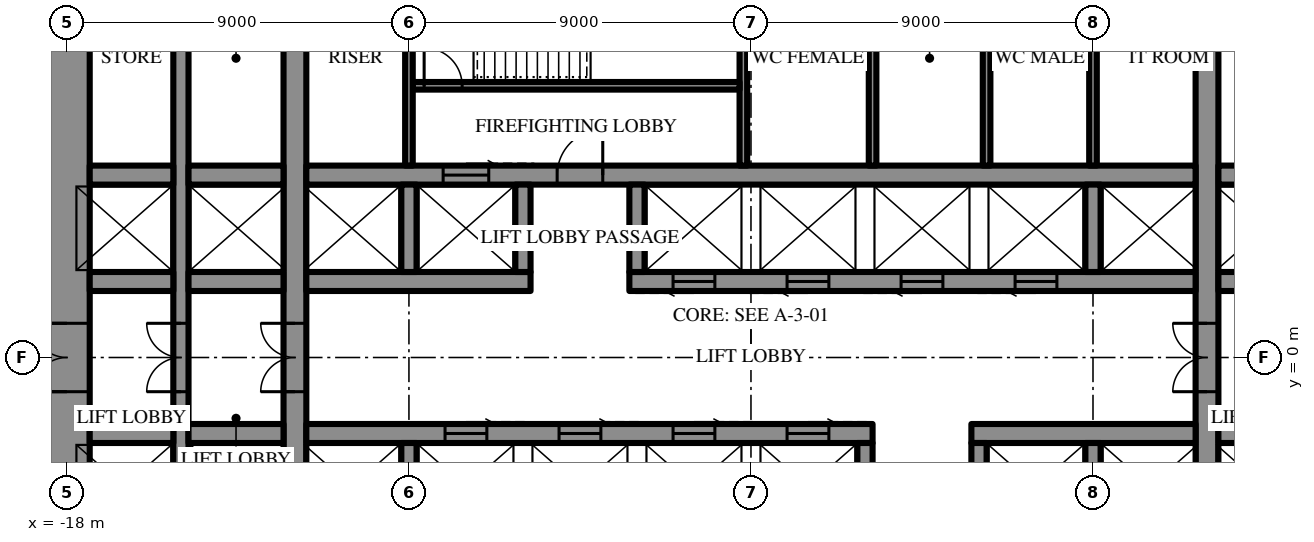
"""IFC4 building model, lengths in metres.
Left out: names, types, materials, properties, quantities, classifications, styles, units other than length and angle.
Written with IfcOpenShell. Run it as: python <this file> out.ifc"""

import sys

from ifc_helpers import new_model, si_unit, direction, frame, frame_2d, origin, place, context, subcontext, project, spatial, rectangle, extrude, element, fill, save


model = new_model("IFC4")
c1 = context("Model", 3, precision=1e-05, world=origin(), true_north=direction((0.0, 1.0)))
c2 = subcontext(c1, "Body", "Model", "MODEL_VIEW")
j1 = project(units=[si_unit("LENGTHUNIT", "METRE"), si_unit("PLANEANGLEUNIT", "RADIAN")], contexts=[c1])
p1 = place(None, origin())
s1 = spatial("IfcSite", under=j1, at=p1, CompositionType="ELEMENT")
p2 = place(p1, origin())
s2 = spatial("IfcBuilding", under=s1, at=p2, CompositionType="ELEMENT")
p3 = place(p2, frame((0.0, 0.0, 52.9)))
s3 = spatial("IfcBuildingStorey", under=s2, at=p3, CompositionType="ELEMENT", Elevation=52.9)
p4 = place(p3, frame((-18.0, 10.7, 0.0), z_axis=(0.0, 0.0, 1.0), x_axis=(0.0, -1.0, 0.0)))
e1 = element("IfcWall", 1, at=p4, inside=s3, PredefinedType="SHEAR", context=c2, shape_type="SweptSolid", body=[
    extrude(rectangle(XDim=21.4, YDim=1.2, at=frame_2d((10.7, 0.0))), origin(), (0.0, 0.0, 1.0), 4.2),
])
p5 = place(p4, frame((9.8, 0.0, 0.0)))
e2 = element("IfcOpeningElement", 2, at=p5, cuts=e1, PredefinedType="OPENING", context=c2, shape_type="SweptSolid", body=[
    extrude(rectangle(XDim=1.8, YDim=2.4, at=frame_2d((0.9, 1.2))), frame((0.0, 0.61, 0.0), z_axis=(0.0, -1.0, 0.0), x_axis=(1.0, 0.0, 0.0)), (0.0, 0.0, 1.0), 1.22),
])
p6 = place(p3, frame((12.0, -10.7, 0.0), z_axis=(0.0, 0.0, 1.0), x_axis=(0.0, 1.0, 0.0)))
e3 = element("IfcWall", 3, at=p6, inside=s3, PredefinedType="SHEAR", context=c2, shape_type="SweptSolid", body=[
    extrude(rectangle(XDim=21.4, YDim=0.6, at=frame_2d((10.7, 0.0))), origin(), (0.0, 0.0, 1.0), 4.2),
])
p7 = place(p6, frame((9.8, 0.0, 0.0)))
e4 = element("IfcOpeningElement", 4, at=p7, cuts=e3, PredefinedType="OPENING", context=c2, shape_type="SweptSolid", body=[
    extrude(rectangle(XDim=1.8, YDim=2.4, at=frame_2d((0.9, 1.2))), frame((0.0, 0.31, 0.0), z_axis=(0.0, -1.0, 0.0), x_axis=(1.0, 0.0, 0.0)), (0.0, 0.0, 1.0), 0.62),
])
p8 = place(p3, frame((-12.0, -10.7, 0.0), z_axis=(0.0, 0.0, 1.0), x_axis=(0.0, 1.0, 0.0)))
e5 = element("IfcWall", 5, at=p8, inside=s3, PredefinedType="SHEAR", context=c2, shape_type="SweptSolid", body=[
    extrude(rectangle(XDim=21.4, YDim=0.6, at=frame_2d((10.7, 0.0))), origin(), (0.0, 0.0, 1.0), 4.2),
])
p9 = place(p8, frame((9.8, 0.0, 0.0)))
e6 = element("IfcOpeningElement", 6, at=p9, cuts=e5, PredefinedType="OPENING", context=c2, shape_type="SweptSolid", body=[
    extrude(rectangle(XDim=1.8, YDim=2.4, at=frame_2d((0.9, 1.2))), frame((0.0, 0.31, 0.0), z_axis=(0.0, -1.0, 0.0), x_axis=(1.0, 0.0, 0.0)), (0.0, 0.0, 1.0), 0.62),
])
p10 = place(p3, frame((-15.0, -10.7, 0.0), z_axis=(0.0, 0.0, 1.0), x_axis=(0.0, 1.0, 0.0)))
e7 = element("IfcWall", 7, at=p10, inside=s3, PredefinedType="SHEAR", context=c2, shape_type="SweptSolid", body=[
    extrude(rectangle(XDim=21.4, YDim=0.4, at=frame_2d((10.7, 0.0))), origin(), (0.0, 0.0, 1.0), 4.2),
])
p11 = place(p10, frame((9.8, 0.0, 0.0)))
e8 = element("IfcOpeningElement", 8, at=p11, cuts=e7, PredefinedType="OPENING", context=c2, shape_type="SweptSolid", body=[
    extrude(rectangle(XDim=1.8, YDim=2.4, at=frame_2d((0.9, 1.2))), frame((0.0, 0.21, 0.0), z_axis=(0.0, -1.0, 0.0), x_axis=(1.0, 0.0, 0.0)), (0.0, 0.0, 1.0), 0.42),
])
p12 = place(p3, frame((-17.4, 2.0, 0.0), z_axis=(0.0, 0.0, 1.0), x_axis=(1.0, 0.0, 0.0)))
e9 = element("IfcWall", 9, at=p12, inside=s3, PredefinedType="SHEAR", context=c2, shape_type="SweptSolid", body=[
    extrude(rectangle(XDim=2.2, YDim=0.5, at=frame_2d((1.1, 0.0))), origin(), (0.0, 0.0, 1.0), 4.2),
])
p13 = place(p3, frame((-14.8, 2.0, 0.0), z_axis=(0.0, 0.0, 1.0), x_axis=(1.0, 0.0, 0.0)))
e10 = element("IfcWall", 10, at=p13, inside=s3, PredefinedType="SHEAR", context=c2, shape_type="SweptSolid", body=[
    extrude(rectangle(XDim=2.5, YDim=0.5, at=frame_2d((1.25, 0.0))), origin(), (0.0, 0.0, 1.0), 4.2),
])
p14 = place(p3, frame((-11.7, 2.0, 0.0), z_axis=(0.0, 0.0, 1.0), x_axis=(1.0, 0.0, 0.0)))
e11 = element("IfcWall", 11, at=p14, inside=s3, PredefinedType="SHEAR", context=c2, shape_type="SweptSolid", body=[
    extrude(rectangle(XDim=5.9, YDim=0.5, at=frame_2d((2.95, 0.0))), origin(), (0.0, 0.0, 1.0), 4.2),
])
p15 = place(p3, frame((-3.2, 2.0, 0.0), z_axis=(0.0, 0.0, 1.0), x_axis=(1.0, 0.0, 0.0)))
e12 = element("IfcWall", 12, at=p15, inside=s3, PredefinedType="SHEAR", context=c2, shape_type="SweptSolid", body=[
    extrude(rectangle(XDim=14.9, YDim=0.5, at=frame_2d((7.45, 0.0))), origin(), (0.0, 0.0, 1.0), 4.2),
])
p16 = place(p15, frame((1.15, 0.0, 0.0)))
e13 = element("IfcOpeningElement", 13, at=p16, cuts=e12, PredefinedType="OPENING", context=c2, shape_type="SweptSolid", body=[
    extrude(rectangle(XDim=1.1, YDim=2.2, at=frame_2d((0.55, 1.1))), frame((0.0, 0.26, 0.0), z_axis=(0.0, -1.0, 0.0), x_axis=(1.0, 0.0, 0.0)), (0.0, 0.0, 1.0), 0.52),
])
p17 = place(p15, frame((4.15, 0.0, 0.0)))
e14 = element("IfcOpeningElement", 14, at=p17, cuts=e12, PredefinedType="OPENING", context=c2, shape_type="SweptSolid", body=[
    extrude(rectangle(XDim=1.1, YDim=2.2, at=frame_2d((0.55, 1.1))), frame((0.0, 0.26, 0.0), z_axis=(0.0, -1.0, 0.0), x_axis=(1.0, 0.0, 0.0)), (0.0, 0.0, 1.0), 0.52),
])
p18 = place(p15, frame((7.15, 0.0, 0.0)))
e15 = element("IfcOpeningElement", 15, at=p18, cuts=e12, PredefinedType="OPENING", context=c2, shape_type="SweptSolid", body=[
    extrude(rectangle(XDim=1.1, YDim=2.2, at=frame_2d((0.55, 1.1))), frame((0.0, 0.26, 0.0), z_axis=(0.0, -1.0, 0.0), x_axis=(1.0, 0.0, 0.0)), (0.0, 0.0, 1.0), 0.52),
])
p19 = place(p15, frame((10.15, 0.0, 0.0)))
e16 = element("IfcOpeningElement", 16, at=p19, cuts=e12, PredefinedType="OPENING", context=c2, shape_type="SweptSolid", body=[
    extrude(rectangle(XDim=1.1, YDim=2.2, at=frame_2d((0.55, 1.1))), frame((0.0, 0.26, 0.0), z_axis=(0.0, -1.0, 0.0), x_axis=(1.0, 0.0, 0.0)), (0.0, 0.0, 1.0), 0.52),
])
p20 = place(p3, frame((12.3, 2.0, 0.0), z_axis=(0.0, 0.0, 1.0), x_axis=(1.0, 0.0, 0.0)))
e17 = element("IfcWall", 17, at=p20, inside=s3, PredefinedType="SHEAR", context=c2, shape_type="SweptSolid", body=[
    extrude(rectangle(XDim=2.5, YDim=0.5, at=frame_2d((1.25, 0.0))), origin(), (0.0, 0.0, 1.0), 4.2),
])
p21 = place(p3, frame((-17.4, 4.8, 0.0), z_axis=(0.0, 0.0, 1.0), x_axis=(1.0, 0.0, 0.0)))
e18 = element("IfcWall", 18, at=p21, inside=s3, PredefinedType="SHEAR", context=c2, shape_type="SweptSolid", body=[
    extrude(rectangle(XDim=2.2, YDim=0.5, at=frame_2d((1.1, 0.0))), origin(), (0.0, 0.0, 1.0), 4.2),
])
p22 = place(p3, frame((-14.8, 4.8, 0.0), z_axis=(0.0, 0.0, 1.0), x_axis=(1.0, 0.0, 0.0)))
e19 = element("IfcWall", 19, at=p22, inside=s3, PredefinedType="SHEAR", context=c2, shape_type="SweptSolid", body=[
    extrude(rectangle(XDim=2.5, YDim=0.5, at=frame_2d((1.25, 0.0))), origin(), (0.0, 0.0, 1.0), 4.2),
])
p23 = place(p3, frame((-11.7, 4.8, 0.0), z_axis=(0.0, 0.0, 1.0), x_axis=(1.0, 0.0, 0.0)))
e20 = element("IfcWall", 20, at=p23, inside=s3, PredefinedType="SHEAR", context=c2, shape_type="SweptSolid", body=[
    extrude(rectangle(XDim=23.4, YDim=0.5, at=frame_2d((11.7, 0.0))), origin(), (0.0, 0.0, 1.0), 4.2),
])
p24 = place(p23, frame((6.6, 0.0, 0.0)))
e21 = element("IfcOpeningElement", 21, at=p24, cuts=e20, PredefinedType="OPENING", context=c2, shape_type="SweptSolid", body=[
    extrude(rectangle(XDim=1.2, YDim=2.2, at=frame_2d((0.6, 1.1))), frame((0.0, 0.26, 0.0), z_axis=(0.0, -1.0, 0.0), x_axis=(1.0, 0.0, 0.0)), (0.0, 0.0, 1.0), 0.52),
])
p25 = place(p23, frame((3.6, 0.0, 0.0)))
e22 = element("IfcOpeningElement", 22, at=p25, cuts=e20, PredefinedType="OPENING", context=c2, shape_type="SweptSolid", body=[
    extrude(rectangle(XDim=1.2, YDim=2.2, at=frame_2d((0.6, 1.1))), frame((0.0, 0.26, 0.0), z_axis=(0.0, -1.0, 0.0), x_axis=(1.0, 0.0, 0.0)), (0.0, 0.0, 1.0), 0.52),
])
p26 = place(p3, frame((12.3, 4.8, 0.0), z_axis=(0.0, 0.0, 1.0), x_axis=(1.0, 0.0, 0.0)))
e23 = element("IfcWall", 23, at=p26, inside=s3, PredefinedType="SHEAR", context=c2, shape_type="SweptSolid", body=[
    extrude(rectangle(XDim=2.5, YDim=0.5, at=frame_2d((1.25, 0.0))), origin(), (0.0, 0.0, 1.0), 4.2),
])
for number, where, z_axis, x_axis in (
    (24, (-9.0, 2.25, 0.0), (0.0, 0.0, 1.0), (0.0, 1.0, 0.0)),
    (25, (-6.0, 2.25, 0.0), (0.0, 0.0, 1.0), (0.0, 1.0, 0.0)),
    (26, (-3.0, 2.25, 0.0), (0.0, 0.0, 1.0), (0.0, 1.0, 0.0)),
    (27, (9.0, 2.25, 0.0), (0.0, 0.0, 1.0), (0.0, 1.0, 0.0)),
):
    element("IfcWall", number, at=place(p3, frame(where, z_axis=z_axis, x_axis=x_axis)), inside=s3, PredefinedType="SHEAR", context=c2, shape_type="SweptSolid", body=[
        extrude(rectangle(XDim=2.3, YDim=0.4, at=frame_2d((1.15, 0.0))), origin(), (0.0, 0.0, 1.0), 4.2),
    ])
p27 = place(p3, frame((-0.2, 5.05, 0.0), z_axis=(0.0, 0.0, 1.0), x_axis=(0.0, 1.0, 0.0)))
e28 = element("IfcWall", 28, at=p27, inside=s3, PredefinedType="SHEAR", context=c2, shape_type="SweptSolid", body=[
    extrude(rectangle(XDim=5.65, YDim=0.2, at=frame_2d((2.825, 0.0))), origin(), (0.0, 0.0, 1.0), 4.2),
])
p28 = place(p3, frame((-8.9, 7.15, 0.0), z_axis=(0.0, 0.0, 1.0), x_axis=(1.0, 0.0, 0.0)))
e29 = element("IfcWall", 29, at=p28, inside=s3, PredefinedType="SHEAR", context=c2, shape_type="SweptSolid", body=[
    extrude(rectangle(XDim=8.6, YDim=0.2, at=frame_2d((4.3, 0.0))), origin(), (0.0, 0.0, 1.0), 4.2),
])
p29 = place(p28, frame((0.3, 0.0, 0.0)))
e30 = element("IfcOpeningElement", 30, at=p29, cuts=e29, PredefinedType="OPENING", context=c2, shape_type="SweptSolid", body=[
    extrude(rectangle(XDim=1.0, YDim=2.2, at=frame_2d((0.5, 1.1))), frame((0.0, 0.11, 0.0), z_axis=(0.0, -1.0, 0.0), x_axis=(1.0, 0.0, 0.0)), (0.0, 0.0, 1.0), 0.22),
])
p30 = place(p3, frame((14.8, -2.0, 0.0), z_axis=(0.0, 0.0, 1.0), x_axis=(-1.0, 0.0, 0.0)))
e31 = element("IfcWall", 31, at=p30, inside=s3, PredefinedType="SHEAR", context=c2, shape_type="SweptSolid", body=[
    extrude(rectangle(XDim=2.5, YDim=0.5, at=frame_2d((1.25, 0.0))), origin(), (0.0, 0.0, 1.0), 4.2),
])
p31 = place(p3, frame((11.7, -2.0, 0.0), z_axis=(0.0, 0.0, 1.0), x_axis=(-1.0, 0.0, 0.0)))
e32 = element("IfcWall", 32, at=p31, inside=s3, PredefinedType="SHEAR", context=c2, shape_type="SweptSolid", body=[
    extrude(rectangle(XDim=5.9, YDim=0.5, at=frame_2d((2.95, 0.0))), origin(), (0.0, 0.0, 1.0), 4.2),
])
p32 = place(p3, frame((3.2, -2.0, 0.0), z_axis=(0.0, 0.0, 1.0), x_axis=(-1.0, 0.0, 0.0)))
e33 = element("IfcWall", 33, at=p32, inside=s3, PredefinedType="SHEAR", context=c2, shape_type="SweptSolid", body=[
    extrude(rectangle(XDim=14.9, YDim=0.5, at=frame_2d((7.45, 0.0))), origin(), (0.0, 0.0, 1.0), 4.2),
])
p33 = place(p32, frame((1.15, 0.0, 0.0)))
e34 = element("IfcOpeningElement", 34, at=p33, cuts=e33, PredefinedType="OPENING", context=c2, shape_type="SweptSolid", body=[
    extrude(rectangle(XDim=1.1, YDim=2.2, at=frame_2d((0.55, 1.1))), frame((0.0, 0.26, 0.0), z_axis=(0.0, -1.0, 0.0), x_axis=(1.0, 0.0, 0.0)), (0.0, 0.0, 1.0), 0.52),
])
p34 = place(p32, frame((4.15, 0.0, 0.0)))
e35 = element("IfcOpeningElement", 35, at=p34, cuts=e33, PredefinedType="OPENING", context=c2, shape_type="SweptSolid", body=[
    extrude(rectangle(XDim=1.1, YDim=2.2, at=frame_2d((0.55, 1.1))), frame((0.0, 0.26, 0.0), z_axis=(0.0, -1.0, 0.0), x_axis=(1.0, 0.0, 0.0)), (0.0, 0.0, 1.0), 0.52),
])
p35 = place(p32, frame((7.15, 0.0, 0.0)))
e36 = element("IfcOpeningElement", 36, at=p35, cuts=e33, PredefinedType="OPENING", context=c2, shape_type="SweptSolid", body=[
    extrude(rectangle(XDim=1.1, YDim=2.2, at=frame_2d((0.55, 1.1))), frame((0.0, 0.26, 0.0), z_axis=(0.0, -1.0, 0.0), x_axis=(1.0, 0.0, 0.0)), (0.0, 0.0, 1.0), 0.52),
])
p36 = place(p32, frame((10.15, 0.0, 0.0)))
e37 = element("IfcOpeningElement", 37, at=p36, cuts=e33, PredefinedType="OPENING", context=c2, shape_type="SweptSolid", body=[
    extrude(rectangle(XDim=1.1, YDim=2.2, at=frame_2d((0.55, 1.1))), frame((0.0, 0.26, 0.0), z_axis=(0.0, -1.0, 0.0), x_axis=(1.0, 0.0, 0.0)), (0.0, 0.0, 1.0), 0.52),
])
p37 = place(p3, frame((-12.3, -2.0, 0.0), z_axis=(0.0, 0.0, 1.0), x_axis=(-1.0, 0.0, 0.0)))
e38 = element("IfcWall", 38, at=p37, inside=s3, PredefinedType="SHEAR", context=c2, shape_type="SweptSolid", body=[
    extrude(rectangle(XDim=2.5, YDim=0.5, at=frame_2d((1.25, 0.0))), origin(), (0.0, 0.0, 1.0), 4.2),
])
p38 = place(p3, frame((-15.2, -2.0, 0.0), z_axis=(0.0, 0.0, 1.0), x_axis=(-1.0, 0.0, 0.0)))
e39 = element("IfcWall", 39, at=p38, inside=s3, PredefinedType="SHEAR", context=c2, shape_type="SweptSolid", body=[
    extrude(rectangle(XDim=2.2, YDim=0.5, at=frame_2d((1.1, 0.0))), origin(), (0.0, 0.0, 1.0), 4.2),
])
for number, where, z_axis, x_axis in (
    (40, (9.0, -2.25, 0.0), (0.0, 0.0, 1.0), (0.0, -1.0, 0.0)),
    (41, (6.0, -2.25, 0.0), (0.0, 0.0, 1.0), (0.0, -1.0, 0.0)),
    (42, (3.0, -2.25, 0.0), (0.0, 0.0, 1.0), (0.0, -1.0, 0.0)),
    (43, (-9.0, -2.25, 0.0), (0.0, 0.0, 1.0), (0.0, -1.0, 0.0)),
):
    element("IfcWall", number, at=place(p3, frame(where, z_axis=z_axis, x_axis=x_axis)), inside=s3, PredefinedType="SHEAR", context=c2, shape_type="SweptSolid", body=[
        extrude(rectangle(XDim=2.3, YDim=0.4, at=frame_2d((1.15, 0.0))), origin(), (0.0, 0.0, 1.0), 4.2),
    ])
for number, where, z_axis, x_axis in (
    (44, (-9.0, 5.05, 0.0), (0.0, 0.0, 1.0), (0.0, 1.0, 0.0)),
    (45, (9.0, 5.05, 0.0), (0.0, 0.0, 1.0), (0.0, 1.0, 0.0)),
    (46, (3.2, 5.05, 0.0), (0.0, 0.0, 1.0), (0.0, 1.0, 0.0)),
    (47, (6.2, 5.05, 0.0), (0.0, 0.0, 1.0), (0.0, 1.0, 0.0)),
):
    element("IfcWall", number, at=place(p3, frame(where, z_axis=z_axis, x_axis=x_axis)), inside=s3, PredefinedType="PARTITIONING", context=c2, shape_type="SweptSolid", body=[
        extrude(rectangle(XDim=5.65, YDim=0.2, at=frame_2d((2.825, 0.0))), origin(), (0.0, 0.0, 1.0), 4.0),
    ])
p39 = place(p5, frame((1.8, 0.0, 0.0), z_axis=(0.0, 0.0, 1.0), x_axis=(-1.0, 0.0, 0.0)))
e48 = element("IfcDoor", 48, at=p39, inside=s3, OperationType="DOUBLE_DOOR_SINGLE_SWING", PredefinedType="DOOR", context=c2, shape_type="SweptSolid", body=[
    extrude(rectangle(XDim=1.8, YDim=2.4, at=frame_2d((0.9, 1.2))), frame((0.0, 0.025, 0.0), z_axis=(0.0, -1.0, 0.0), x_axis=(1.0, 0.0, 0.0)), (0.0, 0.0, 1.0), 0.05),
])
fill(e2, e48)
p40 = place(p24, origin())
e49 = element("IfcDoor", 49, at=p40, inside=s3, OperationType="SINGLE_SWING_LEFT", PredefinedType="DOOR", context=c2, shape_type="SweptSolid", body=[
    extrude(rectangle(XDim=1.2, YDim=2.2, at=frame_2d((0.6, 1.1))), frame((0.0, 0.025, 0.0), z_axis=(0.0, -1.0, 0.0), x_axis=(1.0, 0.0, 0.0)), (0.0, 0.0, 1.0), 0.05),
])
fill(e21, e49)
p41 = place(p29, origin())
e50 = element("IfcDoor", 50, at=p41, inside=s3, OperationType="SINGLE_SWING_RIGHT", PredefinedType="DOOR", context=c2, shape_type="SweptSolid", body=[
    extrude(rectangle(XDim=1.0, YDim=2.2, at=frame_2d((0.5, 1.1))), frame((0.0, 0.025, 0.0), z_axis=(0.0, -1.0, 0.0), x_axis=(1.0, 0.0, 0.0)), (0.0, 0.0, 1.0), 0.05),
])
fill(e30, e50)
p42 = place(p7, origin())
e51 = element("IfcDoor", 51, at=p42, inside=s3, OperationType="DOUBLE_DOOR_SINGLE_SWING", PredefinedType="DOOR", context=c2, shape_type="SweptSolid", body=[
    extrude(rectangle(XDim=1.8, YDim=2.4, at=frame_2d((0.9, 1.2))), frame((0.0, 0.025, 0.0), z_axis=(0.0, -1.0, 0.0), x_axis=(1.0, 0.0, 0.0)), (0.0, 0.0, 1.0), 0.05),
])
fill(e4, e51)
p43 = place(p9, origin())
e52 = element("IfcDoor", 52, at=p43, inside=s3, OperationType="DOUBLE_DOOR_SINGLE_SWING", PredefinedType="DOOR", context=c2, shape_type="SweptSolid", body=[
    extrude(rectangle(XDim=1.8, YDim=2.4, at=frame_2d((0.9, 1.2))), frame((0.0, 0.025, 0.0), z_axis=(0.0, -1.0, 0.0), x_axis=(1.0, 0.0, 0.0)), (0.0, 0.0, 1.0), 0.05),
])
fill(e6, e52)
p44 = place(p11, origin())
e53 = element("IfcDoor", 53, at=p44, inside=s3, OperationType="DOUBLE_DOOR_SINGLE_SWING", PredefinedType="DOOR", context=c2, shape_type="SweptSolid", body=[
    extrude(rectangle(XDim=1.8, YDim=2.4, at=frame_2d((0.9, 1.2))), frame((0.0, 0.025, 0.0), z_axis=(0.0, -1.0, 0.0), x_axis=(1.0, 0.0, 0.0)), (0.0, 0.0, 1.0), 0.05),
])
fill(e8, e53)
p45 = place(p25, origin())
e54 = element("IfcDoor", 54, at=p45, inside=s3, OperationType="SLIDING_TO_LEFT", PredefinedType="DOOR", context=c2, shape_type="SweptSolid", body=[
    extrude(rectangle(XDim=1.2, YDim=2.2, at=frame_2d((0.6, 1.1))), frame((0.0, 0.025, 0.0), z_axis=(0.0, -1.0, 0.0), x_axis=(1.0, 0.0, 0.0)), (0.0, 0.0, 1.0), 0.05),
])
fill(e22, e54)
p46 = place(p16, frame((1.1, 0.0, 0.0), z_axis=(0.0, 0.0, 1.0), x_axis=(-1.0, 0.0, 0.0)))
e55 = element("IfcDoor", 55, at=p46, inside=s3, OperationType="SLIDING_TO_LEFT", PredefinedType="DOOR", context=c2, shape_type="SweptSolid", body=[
    extrude(rectangle(XDim=1.1, YDim=2.2, at=frame_2d((0.55, 1.1))), frame((0.0, 0.025, 0.0), z_axis=(0.0, -1.0, 0.0), x_axis=(1.0, 0.0, 0.0)), (0.0, 0.0, 1.0), 0.05),
])
fill(e13, e55)
p47 = place(p17, frame((1.1, 0.0, 0.0), z_axis=(0.0, 0.0, 1.0), x_axis=(-1.0, 0.0, 0.0)))
e56 = element("IfcDoor", 56, at=p47, inside=s3, OperationType="SLIDING_TO_LEFT", PredefinedType="DOOR", context=c2, shape_type="SweptSolid", body=[
    extrude(rectangle(XDim=1.1, YDim=2.2, at=frame_2d((0.55, 1.1))), frame((0.0, 0.025, 0.0), z_axis=(0.0, -1.0, 0.0), x_axis=(1.0, 0.0, 0.0)), (0.0, 0.0, 1.0), 0.05),
])
fill(e14, e56)
p48 = place(p18, frame((1.1, 0.0, 0.0), z_axis=(0.0, 0.0, 1.0), x_axis=(-1.0, 0.0, 0.0)))
e57 = element("IfcDoor", 57, at=p48, inside=s3, OperationType="SLIDING_TO_LEFT", PredefinedType="DOOR", context=c2, shape_type="SweptSolid", body=[
    extrude(rectangle(XDim=1.1, YDim=2.2, at=frame_2d((0.55, 1.1))), frame((0.0, 0.025, 0.0), z_axis=(0.0, -1.0, 0.0), x_axis=(1.0, 0.0, 0.0)), (0.0, 0.0, 1.0), 0.05),
])
fill(e15, e57)
p49 = place(p19, frame((1.1, 0.0, 0.0), z_axis=(0.0, 0.0, 1.0), x_axis=(-1.0, 0.0, 0.0)))
e58 = element("IfcDoor", 58, at=p49, inside=s3, OperationType="SLIDING_TO_LEFT", PredefinedType="DOOR", context=c2, shape_type="SweptSolid", body=[
    extrude(rectangle(XDim=1.1, YDim=2.2, at=frame_2d((0.55, 1.1))), frame((0.0, 0.025, 0.0), z_axis=(0.0, -1.0, 0.0), x_axis=(1.0, 0.0, 0.0)), (0.0, 0.0, 1.0), 0.05),
])
fill(e16, e58)
p50 = place(p33, frame((1.1, 0.0, 0.0), z_axis=(0.0, 0.0, 1.0), x_axis=(-1.0, 0.0, 0.0)))
e59 = element("IfcDoor", 59, at=p50, inside=s3, OperationType="SLIDING_TO_LEFT", PredefinedType="DOOR", context=c2, shape_type="SweptSolid", body=[
    extrude(rectangle(XDim=1.1, YDim=2.2, at=frame_2d((0.55, 1.1))), frame((0.0, 0.025, 0.0), z_axis=(0.0, -1.0, 0.0), x_axis=(1.0, 0.0, 0.0)), (0.0, 0.0, 1.0), 0.05),
])
fill(e34, e59)
p51 = place(p34, frame((1.1, 0.0, 0.0), z_axis=(0.0, 0.0, 1.0), x_axis=(-1.0, 0.0, 0.0)))
e60 = element("IfcDoor", 60, at=p51, inside=s3, OperationType="SLIDING_TO_LEFT", PredefinedType="DOOR", context=c2, shape_type="SweptSolid", body=[
    extrude(rectangle(XDim=1.1, YDim=2.2, at=frame_2d((0.55, 1.1))), frame((0.0, 0.025, 0.0), z_axis=(0.0, -1.0, 0.0), x_axis=(1.0, 0.0, 0.0)), (0.0, 0.0, 1.0), 0.05),
])
fill(e35, e60)
p52 = place(p35, frame((1.1, 0.0, 0.0), z_axis=(0.0, 0.0, 1.0), x_axis=(-1.0, 0.0, 0.0)))
e61 = element("IfcDoor", 61, at=p52, inside=s3, OperationType="SLIDING_TO_LEFT", PredefinedType="DOOR", context=c2, shape_type="SweptSolid", body=[
    extrude(rectangle(XDim=1.1, YDim=2.2, at=frame_2d((0.55, 1.1))), frame((0.0, 0.025, 0.0), z_axis=(0.0, -1.0, 0.0), x_axis=(1.0, 0.0, 0.0)), (0.0, 0.0, 1.0), 0.05),
])
fill(e36, e61)
p53 = place(p36, frame((1.1, 0.0, 0.0), z_axis=(0.0, 0.0, 1.0), x_axis=(-1.0, 0.0, 0.0)))
e62 = element("IfcDoor", 62, at=p53, inside=s3, OperationType="SLIDING_TO_LEFT", PredefinedType="DOOR", context=c2, shape_type="SweptSolid", body=[
    extrude(rectangle(XDim=1.1, YDim=2.2, at=frame_2d((0.55, 1.1))), frame((0.0, 0.025, 0.0), z_axis=(0.0, -1.0, 0.0), x_axis=(1.0, 0.0, 0.0)), (0.0, 0.0, 1.0), 0.05),
])
fill(e37, e62)
save(model, sys.argv[1])
